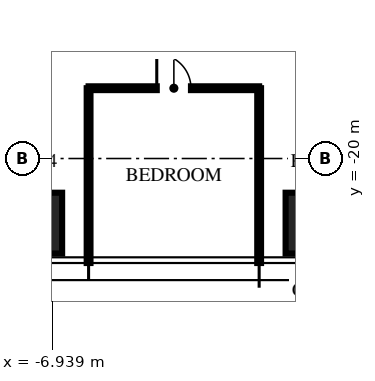
"""IFC4 building model, lengths in metres.
Left out: names, types, materials, properties, quantities, classifications, styles, units other than length and angle.
Written with IfcOpenShell. Run it as: python <this file> out.ifc"""

import sys

from ifc_helpers import new_model, si_unit, direction, frame, frame_2d, origin, origin_2d, place, context, subcontext, project, spatial, rectangle, extrude, element, fill, save


model = new_model("IFC4")
c1 = context("Model", 3, precision=1e-05, world=origin(), true_north=direction((0.0, 1.0)))
c2 = subcontext(c1, "Body", "Model", "MODEL_VIEW")
j1 = project(units=[si_unit("LENGTHUNIT", "METRE"), si_unit("PLANEANGLEUNIT", "RADIAN")], contexts=[c1])
p1 = place(None, origin())
s1 = spatial("IfcSite", under=j1, at=p1, CompositionType="ELEMENT")
p2 = place(p1, origin())
s2 = spatial("IfcBuilding", under=s1, at=p2, CompositionType="ELEMENT")
p3 = place(p2, frame((0.0, 0.0, 349.5)))
s3 = spatial("IfcBuildingStorey", under=s2, at=p3, CompositionType="ELEMENT", Elevation=349.5)
for number, where, z_axis, x_axis in (
    (1, (0.0, -21.7, 0.0), (0.0, 0.0, 1.0), (1.0, 0.0, 0.0)),
    (2, (-7.48, -21.7, 0.0), (0.0, 0.0, 1.0), (1.0, 0.0, 0.0)),
):
    element("IfcColumn", number, at=place(p3, frame(where, z_axis=z_axis, x_axis=x_axis)), inside=s3, PredefinedType="COLUMN", context=c2, shape_type="SweptSolid", body=[
        extrude(rectangle(XDim=1.6, YDim=1.6, at=origin_2d()), origin(), (0.0, 0.0, 1.0), 3.75),
    ])
for number, where, z_axis, x_axis in (
    (3, (-5.984, -18.15, 0.0), (0.0, 0.0, 1.0), (0.0, -1.0, 0.0)),
    (4, (-1.496, -18.15, 0.0), (0.0, 0.0, 1.0), (0.0, -1.0, 0.0)),
):
    element("IfcWall", number, at=place(p3, frame(where, z_axis=z_axis, x_axis=x_axis)), inside=s3, PredefinedType="PARTITIONING", context=c2, shape_type="SweptSolid", body=[
        extrude(rectangle(XDim=4.6, YDim=0.1, at=frame_2d((2.3, 0.0))), origin(), (0.0, 0.0, 1.0), 2.85),
    ])
p4 = place(p3, frame((-5.984, -18.15, 0.0), z_axis=(0.0, 0.0, 1.0), x_axis=(1.0, 0.0, 0.0)))
e5 = element("IfcWall", 5, at=p4, inside=s3, PredefinedType="PARTITIONING", context=c2, shape_type="SweptSolid", body=[
    extrude(rectangle(XDim=4.488, YDim=0.1, at=frame_2d((2.244, 0.0))), origin(), (0.0, 0.0, 1.0), 2.56),
])
p5 = place(p4, frame((1.794, 0.0, 0.0)))
e6 = element("IfcOpeningElement", 6, at=p5, cuts=e5, PredefinedType="OPENING", context=c2, shape_type="SweptSolid", body=[
    extrude(rectangle(XDim=0.9, YDim=2.1, at=frame_2d((0.45, 1.05))), frame((0.0, 0.06, 0.0), z_axis=(0.0, -1.0, 0.0), x_axis=(1.0, 0.0, 0.0)), (0.0, 0.0, 1.0), 0.12),
])
p6 = place(p5, origin())
e7 = element("IfcDoor", 7, at=p6, inside=s3, OperationType="SINGLE_SWING_LEFT", PredefinedType="DOOR", context=c2, shape_type="SweptSolid", body=[
    extrude(rectangle(XDim=0.9, YDim=2.1, at=frame_2d((0.45, 1.05))), frame((0.0, 0.025, 0.0), z_axis=(0.0, -1.0, 0.0), x_axis=(1.0, 0.0, 0.0)), (0.0, 0.0, 1.0), 0.05),
])
fill(e6, e7)
save(model, sys.argv[1])
